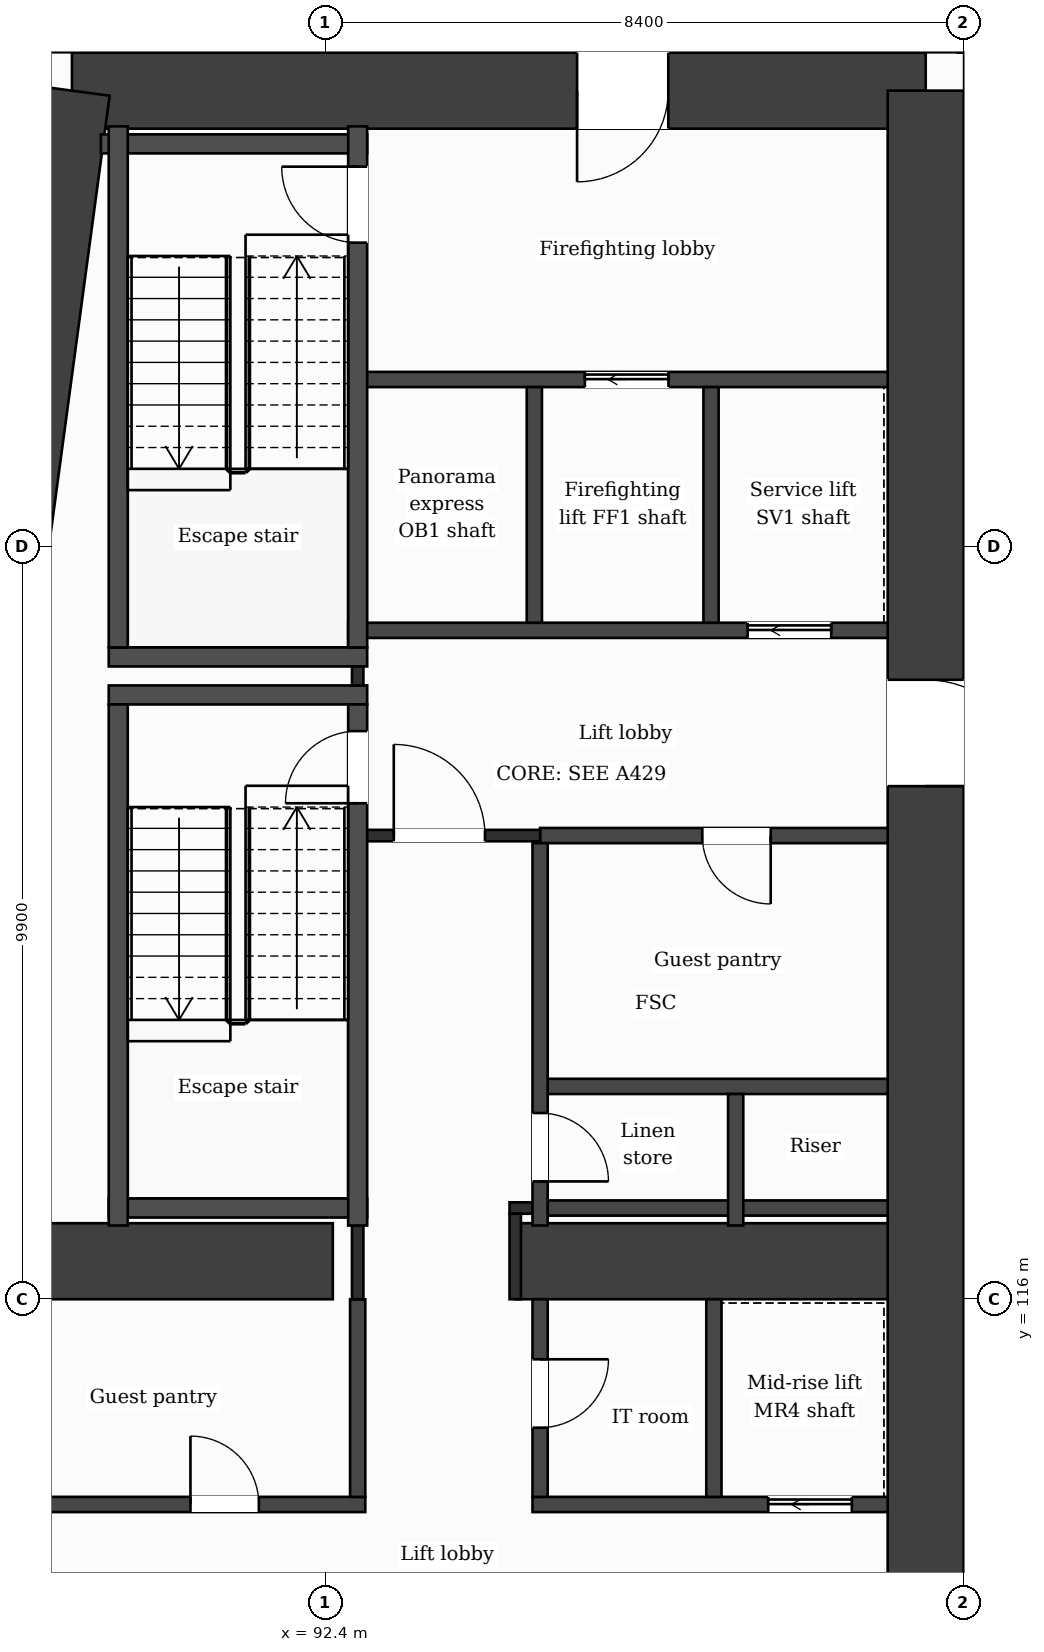
"""IFC4 building model, lengths in metres.
Left out: names, types, materials, properties, quantities, classifications, styles, units other than length and angle.
Written with IfcOpenShell. Run it as: python <this file> out.ifc"""

import sys

from ifc_helpers import new_model, si_unit, direction, frame, frame_2d, origin, place, context, subcontext, project, spatial, rectangle, extrude, element, fill, save


model = new_model("IFC4")
c1 = context("Model", 3, precision=1e-05, world=origin(), true_north=direction((0.0, 1.0)))
c2 = subcontext(c1, "Body", "Model", "MODEL_VIEW")
j1 = project(units=[si_unit("LENGTHUNIT", "METRE"), si_unit("PLANEANGLEUNIT", "RADIAN")], contexts=[c1])
p1 = place(None, origin())
s1 = spatial("IfcSite", under=j1, at=p1, CompositionType="ELEMENT")
p2 = place(p1, origin())
s2 = spatial("IfcBuilding", under=s1, at=p2, CompositionType="ELEMENT")
p3 = place(p2, frame((0.0, 0.0, 120.6)))
s3 = spatial("IfcBuildingStorey", under=s2, at=p3, CompositionType="ELEMENT", Elevation=120.6)
p4 = place(p3, frame((89.068, 131.9, 0.0), z_axis=(0.0, 0.0, 1.0), x_axis=(1.0, 0.0, 0.0)))
e1 = element("IfcWall", 1, at=p4, inside=s3, PredefinedType="SHEAR", context=c2, shape_type="SweptSolid", body=[
    extrude(rectangle(XDim=11.232, YDim=1.0, at=frame_2d((5.616, 0.0))), origin(), (0.0, 0.0, 1.0), 3.7),
])
p5 = place(p4, frame((6.646, 0.0, 0.0)))
e2 = element("IfcOpeningElement", 2, at=p5, cuts=e1, PredefinedType="OPENING", context=c2, shape_type="SweptSolid", body=[
    extrude(rectangle(XDim=1.2, YDim=2.1, at=frame_2d((0.6, 1.05))), frame((0.0, 0.51, 0.0), z_axis=(0.0, -1.0, 0.0), x_axis=(1.0, 0.0, 0.0)), (0.0, 0.0, 1.0), 1.02),
])
p6 = place(p3, frame((100.3, 131.9, 0.0), z_axis=(0.0, 0.0, 1.0), x_axis=(0.0, -1.0, 0.0)))
e3 = element("IfcWall", 3, at=p6, inside=s3, PredefinedType="SHEAR", context=c2, shape_type="SweptSolid", body=[
    extrude(rectangle(XDim=21.0, YDim=1.0, at=frame_2d((10.5, 0.0))), origin(), (0.0, 0.0, 1.0), 3.7),
])
p7 = place(p6, frame((7.75, 0.0, 0.0)))
e4 = element("IfcOpeningElement", 4, at=p7, cuts=e3, PredefinedType="OPENING", context=c2, shape_type="SweptSolid", body=[
    extrude(rectangle(XDim=1.4, YDim=2.1, at=frame_2d((0.7, 1.05))), frame((0.0, 0.51, 0.0), z_axis=(0.0, -1.0, 0.0), x_axis=(1.0, 0.0, 0.0)), (0.0, 0.0, 1.0), 1.02),
])
p8 = place(p3, frame((86.241, 110.9, 0.0), z_axis=(0.0, 0.0, 1.0), x_axis=(0.133411141623, 0.991060778808, 0.0)))
e5 = element("IfcWall", 5, at=p8, inside=s3, PredefinedType="SHEAR", context=c2, shape_type="SweptSolid", body=[
    extrude(rectangle(XDim=21.189, YDim=1.0, at=frame_2d((10.595, 0.0))), origin(), (0.0, 0.0, 1.0), 3.7),
])
p9 = place(p3, frame((87.423, 116.5, 0.0), z_axis=(0.0, 0.0, 1.0), x_axis=(1.0, 0.0, 0.0)))
e6 = element("IfcWall", 6, at=p9, inside=s3, PredefinedType="SHEAR", context=c2, shape_type="SweptSolid", body=[
    extrude(rectangle(XDim=5.077, YDim=1.0, at=frame_2d((2.539, 0.0))), origin(), (0.0, 0.0, 1.0), 3.7),
])
p10 = place(p3, frame((94.9, 116.5, 0.0), z_axis=(0.0, 0.0, 1.0), x_axis=(1.0, 0.0, 0.0)))
e7 = element("IfcWall", 7, at=p10, inside=s3, PredefinedType="SHEAR", context=c2, shape_type="SweptSolid", body=[
    extrude(rectangle(XDim=4.9, YDim=1.0, at=frame_2d((2.45, 0.0))), origin(), (0.0, 0.0, 1.0), 3.7),
])
p11 = place(p3, frame((91.177, 138.95, 0.0), z_axis=(0.0, 0.0, 1.0), x_axis=(-0.133426664613, -0.991058689065, 0.0)))
e8 = element("IfcWall", 8, at=p11, inside=s3, PredefinedType="SOLIDWALL", context=c2, shape_type="SweptSolid", body=[
    extrude(rectangle(XDim=6.609, YDim=0.3, at=frame_2d((3.305, 0.0))), origin(), (0.0, 0.0, 1.0), 3.38),
])
p12 = place(p11, frame((1.039, 0.0, 0.9)))
e9 = element("IfcOpeningElement", 9, at=p12, cuts=e8, PredefinedType="OPENING", context=c2, shape_type="SweptSolid", body=[
    extrude(rectangle(XDim=1.2, YDim=2.1, at=frame_2d((0.6, 1.05))), frame((0.0, 0.16, 0.0), z_axis=(0.0, -1.0, 0.0), x_axis=(1.0, 0.0, 0.0)), (0.0, 0.0, 1.0), 0.32),
])
p13 = place(p11, frame((4.294, 0.0, 0.0)))
e10 = element("IfcOpeningElement", 10, at=p13, cuts=e8, PredefinedType="OPENING", context=c2, shape_type="SweptSolid", body=[
    extrude(rectangle(XDim=1.2, YDim=2.4, at=frame_2d((0.6, 1.2))), frame((0.0, 0.16, 0.0), z_axis=(0.0, -1.0, 0.0), x_axis=(1.0, 0.0, 0.0)), (0.0, 0.0, 1.0), 0.32),
])
p14 = place(p3, frame((87.039, 113.3, 0.0), z_axis=(0.0, 0.0, 1.0), x_axis=(1.0, 0.0, 0.0)))
e11 = element("IfcWall", 11, at=p14, inside=s3, PredefinedType="PARTITIONING", context=c2, shape_type="SweptSolid", body=[
    extrude(rectangle(XDim=5.888, YDim=0.2, at=frame_2d((2.944, 0.0))), origin(), (0.0, 0.0, 1.0), 3.38),
])
p15 = place(p14, frame((3.588, 0.0, 0.0)))
e12 = element("IfcOpeningElement", 12, at=p15, cuts=e11, PredefinedType="OPENING", context=c2, shape_type="SweptSolid", body=[
    extrude(rectangle(XDim=0.9, YDim=2.1, at=frame_2d((0.45, 1.05))), frame((0.0, 0.11, 0.0), z_axis=(0.0, -1.0, 0.0), x_axis=(1.0, 0.0, 0.0)), (0.0, 0.0, 1.0), 0.22),
])
p16 = place(p3, frame((95.127, 113.3, 0.0), z_axis=(0.0, 0.0, 1.0), x_axis=(1.0, 0.0, 0.0)))
e13 = element("IfcWall", 13, at=p16, inside=s3, PredefinedType="PARTITIONING", context=c2, shape_type="SweptSolid", body=[
    extrude(rectangle(XDim=4.673, YDim=0.2, at=frame_2d((2.336, 0.0))), origin(), (0.0, 0.0, 1.0), 3.38),
])
p17 = place(p16, frame((3.101, 0.0, 0.0)))
e14 = element("IfcOpeningElement", 14, at=p17, cuts=e13, PredefinedType="OPENING", context=c2, shape_type="SweptSolid", body=[
    extrude(rectangle(XDim=1.1, YDim=2.1, at=frame_2d((0.55, 1.05))), frame((0.0, 0.11, 0.0), z_axis=(0.0, -1.0, 0.0), x_axis=(1.0, 0.0, 0.0)), (0.0, 0.0, 1.0), 0.22),
])
p18 = place(p3, frame((95.227, 117.2, 0.0), z_axis=(0.0, 0.0, 1.0), x_axis=(1.0, 0.0, 0.0)))
e15 = element("IfcWall", 15, at=p18, inside=s3, PredefinedType="PARTITIONING", context=c2, shape_type="SweptSolid", body=[
    extrude(rectangle(XDim=4.573, YDim=0.2, at=frame_2d((2.287, 0.0))), origin(), (0.0, 0.0, 1.0), 3.38),
])
p19 = place(p3, frame((94.825, 117.2, 0.0), z_axis=(0.0, 0.0, 1.0), x_axis=(1.0, 0.0, 0.0)))
e16 = element("IfcWall", 16, at=p19, inside=s3, PredefinedType="PARTITIONING", context=c2, shape_type="SweptSolid", body=[
    extrude(rectangle(XDim=0.402, YDim=0.15, at=frame_2d((0.201, 0.0))), origin(), (0.0, 0.0, 1.0), 3.38),
])
p20 = place(p3, frame((89.552, 117.2, 0.0), z_axis=(0.0, 0.0, 1.0), x_axis=(1.0, 0.0, 0.0)))
e17 = element("IfcWall", 17, at=p20, inside=s3, PredefinedType="PARTITIONING", context=c2, shape_type="SweptSolid", body=[
    extrude(rectangle(XDim=3.4, YDim=0.25, at=frame_2d((1.7, 0.0))), origin(), (0.0, 0.0, 1.0), 3.38),
])
p21 = place(p3, frame((95.227, 118.8, 0.0), z_axis=(0.0, 0.0, 1.0), x_axis=(1.0, 0.0, 0.0)))
e18 = element("IfcWall", 18, at=p21, inside=s3, PredefinedType="PARTITIONING", context=c2, shape_type="SweptSolid", body=[
    extrude(rectangle(XDim=4.573, YDim=0.2, at=frame_2d((2.287, 0.0))), origin(), (0.0, 0.0, 1.0), 3.38),
])
p22 = place(p3, frame((95.227, 122.1, 0.0), z_axis=(0.0, 0.0, 1.0), x_axis=(1.0, 0.0, 0.0)))
e19 = element("IfcWall", 19, at=p22, inside=s3, PredefinedType="PARTITIONING", context=c2, shape_type="SweptSolid", body=[
    extrude(rectangle(XDim=4.573, YDim=0.2, at=frame_2d((2.287, 0.0))), origin(), (0.0, 0.0, 1.0), 3.38),
])
p23 = place(p22, frame((2.134, 0.0, 0.0)))
e20 = element("IfcOpeningElement", 20, at=p23, cuts=e19, PredefinedType="OPENING", context=c2, shape_type="SweptSolid", body=[
    extrude(rectangle(XDim=0.9, YDim=2.1, at=frame_2d((0.45, 1.05))), frame((0.0, 0.11, 0.0), z_axis=(0.0, -1.0, 0.0), x_axis=(1.0, 0.0, 0.0)), (0.0, 0.0, 1.0), 0.22),
])
p24 = place(p3, frame((92.827, 122.1, 0.0), z_axis=(0.0, 0.0, 1.0), x_axis=(1.0, 0.0, 0.0)))
e21 = element("IfcWall", 21, at=p24, inside=s3, PredefinedType="PARTITIONING", context=c2, shape_type="SweptSolid", body=[
    extrude(rectangle(XDim=2.4, YDim=0.15, at=frame_2d((1.2, 0.0))), origin(), (0.0, 0.0, 1.0), 3.38),
])
p25 = place(p24, frame((0.475, 0.0, 0.0)))
e22 = element("IfcOpeningElement", 22, at=p25, cuts=e21, PredefinedType="OPENING", context=c2, shape_type="SweptSolid", body=[
    extrude(rectangle(XDim=1.2, YDim=2.1, at=frame_2d((0.6, 1.05))), frame((0.0, 0.085, 0.0), z_axis=(0.0, -1.0, 0.0), x_axis=(1.0, 0.0, 0.0)), (0.0, 0.0, 1.0), 0.17),
])
for number, where, z_axis, x_axis in (
    (23, (89.552, 123.95, 0.0), (0.0, 0.0, 1.0), (1.0, 0.0, 0.0)),
    (24, (89.552, 124.45, 0.0), (0.0, 0.0, 1.0), (1.0, 0.0, 0.0)),
):
    element("IfcWall", number, at=place(p3, frame(where, z_axis=z_axis, x_axis=x_axis)), inside=s3, PredefinedType="PARTITIONING", context=c2, shape_type="SweptSolid", body=[
        extrude(rectangle(XDim=3.4, YDim=0.25, at=frame_2d((1.7, 0.0))), origin(), (0.0, 0.0, 1.0), 3.38),
    ])
p26 = place(p3, frame((92.702, 124.8, 0.0), z_axis=(0.0, 0.0, 1.0), x_axis=(1.0, 0.0, 0.0)))
e25 = element("IfcWall", 25, at=p26, inside=s3, PredefinedType="PARTITIONING", context=c2, shape_type="SweptSolid", body=[
    extrude(rectangle(XDim=7.098, YDim=0.2, at=frame_2d((3.549, 0.0))), origin(), (0.0, 0.0, 1.0), 3.38),
])
p27 = place(p26, frame((5.255, 0.0, 0.0)))
e26 = element("IfcOpeningElement", 26, at=p27, cuts=e25, PredefinedType="OPENING", context=c2, shape_type="SweptSolid", body=[
    extrude(rectangle(XDim=1.1, YDim=2.1, at=frame_2d((0.55, 1.05))), frame((0.0, 0.11, 0.0), z_axis=(0.0, -1.0, 0.0), x_axis=(1.0, 0.0, 0.0)), (0.0, 0.0, 1.0), 0.22),
])
p28 = place(p3, frame((92.827, 128.1, 0.0), z_axis=(0.0, 0.0, 1.0), x_axis=(1.0, 0.0, 0.0)))
e27 = element("IfcWall", 27, at=p28, inside=s3, PredefinedType="PARTITIONING", context=c2, shape_type="SweptSolid", body=[
    extrude(rectangle(XDim=6.973, YDim=0.2, at=frame_2d((3.487, 0.0))), origin(), (0.0, 0.0, 1.0), 3.38),
])
p29 = place(p28, frame((2.989, 0.0, 0.0)))
e28 = element("IfcOpeningElement", 28, at=p29, cuts=e27, PredefinedType="OPENING", context=c2, shape_type="SweptSolid", body=[
    extrude(rectangle(XDim=1.1, YDim=2.1, at=frame_2d((0.55, 1.05))), frame((0.0, 0.11, 0.0), z_axis=(0.0, -1.0, 0.0), x_axis=(1.0, 0.0, 0.0)), (0.0, 0.0, 1.0), 0.22),
])
p30 = place(p3, frame((89.448, 131.2, 0.0), z_axis=(0.0, 0.0, 1.0), x_axis=(1.0, 0.0, 0.0)))
e29 = element("IfcWall", 29, at=p30, inside=s3, PredefinedType="PARTITIONING", context=c2, shape_type="SweptSolid", body=[
    extrude(rectangle(XDim=3.504, YDim=0.25, at=frame_2d((1.752, 0.0))), origin(), (0.0, 0.0, 1.0), 3.38),
])
for number, where, z_axis, x_axis in (
    (30, (89.677, 116.97, 0.0), (0.0, 0.0, 1.0), (0.0, 1.0, 0.0)),
    (31, (89.677, 124.575, 0.0), (0.0, 0.0, 1.0), (0.0, 1.0, 0.0)),
):
    element("IfcWall", number, at=place(p3, frame(where, z_axis=z_axis, x_axis=x_axis)), inside=s3, PredefinedType="PARTITIONING", context=c2, shape_type="SweptSolid", body=[
        extrude(rectangle(XDim=6.855, YDim=0.25, at=frame_2d((3.427, 0.0))), origin(), (0.0, 0.0, 1.0), 3.38),
    ])
p31 = place(p3, frame((92.827, 113.4, 0.0), z_axis=(0.0, 0.0, 1.0), x_axis=(0.0, 1.0, 0.0)))
e32 = element("IfcWall", 32, at=p31, inside=s3, PredefinedType="PARTITIONING", context=c2, shape_type="SweptSolid", body=[
    extrude(rectangle(XDim=2.6, YDim=0.2, at=frame_2d((1.3, 0.0))), origin(), (0.0, 0.0, 1.0), 3.38),
])
p32 = place(p3, frame((92.827, 116.0, 0.0), z_axis=(0.0, 0.0, 1.0), x_axis=(0.0, 1.0, 0.0)))
e33 = element("IfcWall", 33, at=p32, inside=s3, PredefinedType="PARTITIONING", context=c2, shape_type="SweptSolid", body=[
    extrude(rectangle(XDim=0.97, YDim=0.15, at=frame_2d((0.485, 0.0))), origin(), (0.0, 0.0, 1.0), 3.38),
])
p33 = place(p3, frame((92.827, 124.075, 0.0), z_axis=(0.0, 0.0, 1.0), x_axis=(0.0, 1.0, 0.0)))
e34 = element("IfcWall", 34, at=p33, inside=s3, PredefinedType="PARTITIONING", context=c2, shape_type="SweptSolid", body=[
    extrude(rectangle(XDim=0.25, YDim=0.15, at=frame_2d((0.125, 0.0))), origin(), (0.0, 0.0, 1.0), 3.38),
])
p34 = place(p3, frame((92.827, 116.97, 0.0), z_axis=(0.0, 0.0, 1.0), x_axis=(0.0, 1.0, 0.0)))
e35 = element("IfcWall", 35, at=p34, inside=s3, PredefinedType="PARTITIONING", context=c2, shape_type="SweptSolid", body=[
    extrude(rectangle(XDim=6.855, YDim=0.25, at=frame_2d((3.427, 0.0))), origin(), (0.0, 0.0, 1.0), 3.38),
])
p35 = place(p34, frame((5.555, 0.0, 0.0)))
e36 = element("IfcOpeningElement", 36, at=p35, cuts=e35, PredefinedType="OPENING", context=c2, shape_type="SweptSolid", body=[
    extrude(rectangle(XDim=0.95, YDim=2.1, at=frame_2d((0.475, 1.05))), frame((0.0, 0.135, 0.0), z_axis=(0.0, -1.0, 0.0), x_axis=(1.0, 0.0, 0.0)), (0.0, 0.0, 1.0), 0.27),
])
p36 = place(p3, frame((92.827, 124.575, 0.0), z_axis=(0.0, 0.0, 1.0), x_axis=(0.0, 1.0, 0.0)))
e37 = element("IfcWall", 37, at=p36, inside=s3, PredefinedType="PARTITIONING", context=c2, shape_type="SweptSolid", body=[
    extrude(rectangle(XDim=6.855, YDim=0.25, at=frame_2d((3.427, 0.0))), origin(), (0.0, 0.0, 1.0), 3.38),
])
p37 = place(p36, frame((5.325, 0.0, 0.0)))
e38 = element("IfcOpeningElement", 38, at=p37, cuts=e37, PredefinedType="OPENING", context=c2, shape_type="SweptSolid", body=[
    extrude(rectangle(XDim=1.0, YDim=2.1, at=frame_2d((0.5, 1.05))), frame((0.0, 0.135, 0.0), z_axis=(0.0, -1.0, 0.0), x_axis=(1.0, 0.0, 0.0)), (0.0, 0.0, 1.0), 0.27),
])
p38 = place(p3, frame((94.9, 116.0, 0.0), z_axis=(0.0, 0.0, 1.0), x_axis=(0.0, 1.0, 0.0)))
e39 = element("IfcWall", 39, at=p38, inside=s3, PredefinedType="PARTITIONING", context=c2, shape_type="SweptSolid", body=[
    extrude(rectangle(XDim=1.125, YDim=0.15, at=frame_2d((0.562, 0.0))), origin(), (0.0, 0.0, 1.0), 3.38),
])
p39 = place(p3, frame((95.151, 124.9, 0.0), z_axis=(0.0, 0.0, 1.0), x_axis=(0.0, 1.0, 0.0)))
e40 = element("IfcWall", 40, at=p39, inside=s3, PredefinedType="PARTITIONING", context=c2, shape_type="SweptSolid", body=[
    extrude(rectangle(XDim=3.1, YDim=0.2, at=frame_2d((1.55, 0.0))), origin(), (0.0, 0.0, 1.0), 3.38),
])
p40 = place(p3, frame((95.227, 113.4, 0.0), z_axis=(0.0, 0.0, 1.0), x_axis=(0.0, 1.0, 0.0)))
e41 = element("IfcWall", 41, at=p40, inside=s3, PredefinedType="PARTITIONING", context=c2, shape_type="SweptSolid", body=[
    extrude(rectangle(XDim=2.6, YDim=0.2, at=frame_2d((1.3, 0.0))), origin(), (0.0, 0.0, 1.0), 3.38),
])
p41 = place(p40, frame((0.91, 0.0, 0.0)))
e42 = element("IfcOpeningElement", 42, at=p41, cuts=e41, PredefinedType="OPENING", context=c2, shape_type="SweptSolid", body=[
    extrude(rectangle(XDim=0.9, YDim=2.1, at=frame_2d((0.45, 1.05))), frame((0.0, 0.11, 0.0), z_axis=(0.0, -1.0, 0.0), x_axis=(1.0, 0.0, 0.0)), (0.0, 0.0, 1.0), 0.22),
])
p42 = place(p3, frame((95.227, 116.97, 0.0), z_axis=(0.0, 0.0, 1.0), x_axis=(0.0, 1.0, 0.0)))
e43 = element("IfcWall", 43, at=p42, inside=s3, PredefinedType="PARTITIONING", context=c2, shape_type="SweptSolid", body=[
    extrude(rectangle(XDim=5.03, YDim=0.2, at=frame_2d((2.515, 0.0))), origin(), (0.0, 0.0, 1.0), 3.38),
])
p43 = place(p42, frame((0.58, 0.0, 0.0)))
e44 = element("IfcOpeningElement", 44, at=p43, cuts=e43, PredefinedType="OPENING", context=c2, shape_type="SweptSolid", body=[
    extrude(rectangle(XDim=0.9, YDim=2.1, at=frame_2d((0.45, 1.05))), frame((0.0, 0.11, 0.0), z_axis=(0.0, -1.0, 0.0), x_axis=(1.0, 0.0, 0.0)), (0.0, 0.0, 1.0), 0.22),
])
p44 = place(p3, frame((97.476, 124.9, 0.0), z_axis=(0.0, 0.0, 1.0), x_axis=(0.0, 1.0, 0.0)))
e45 = element("IfcWall", 45, at=p44, inside=s3, PredefinedType="PARTITIONING", context=c2, shape_type="SweptSolid", body=[
    extrude(rectangle(XDim=3.1, YDim=0.2, at=frame_2d((1.55, 0.0))), origin(), (0.0, 0.0, 1.0), 3.38),
])
p45 = place(p3, frame((97.513, 113.4, 0.0), z_axis=(0.0, 0.0, 1.0), x_axis=(0.0, 1.0, 0.0)))
e46 = element("IfcWall", 46, at=p45, inside=s3, PredefinedType="PARTITIONING", context=c2, shape_type="SweptSolid", body=[
    extrude(rectangle(XDim=2.6, YDim=0.2, at=frame_2d((1.3, 0.0))), origin(), (0.0, 0.0, 1.0), 3.38),
])
p46 = place(p3, frame((97.8, 116.97, 0.0), z_axis=(0.0, 0.0, 1.0), x_axis=(0.0, 1.0, 0.0)))
e47 = element("IfcWall", 47, at=p46, inside=s3, PredefinedType="PARTITIONING", context=c2, shape_type="SweptSolid", body=[
    extrude(rectangle(XDim=1.73, YDim=0.2, at=frame_2d((0.865, 0.0))), origin(), (0.0, 0.0, 1.0), 3.38),
])
p47 = place(p25, origin())
e48 = element("IfcDoor", 48, at=p47, inside=s3, OperationType="SINGLE_SWING_LEFT", PredefinedType="DOOR", context=c2, shape_type="SweptSolid", body=[
    extrude(rectangle(XDim=1.2, YDim=2.1, at=frame_2d((0.6, 1.05))), frame((0.0, 0.025, 0.0), z_axis=(0.0, -1.0, 0.0), x_axis=(1.0, 0.0, 0.0)), (0.0, 0.0, 1.0), 0.05),
])
fill(e22, e48)
p48 = place(p29, origin())
e49 = element("IfcDoor", 49, at=p48, inside=s3, OperationType="SLIDING_TO_LEFT", PredefinedType="DOOR", context=c2, shape_type="SweptSolid", body=[
    extrude(rectangle(XDim=1.1, YDim=2.1, at=frame_2d((0.55, 1.05))), frame((0.0, 0.025, 0.0), z_axis=(0.0, -1.0, 0.0), x_axis=(1.0, 0.0, 0.0)), (0.0, 0.0, 1.0), 0.05),
])
fill(e28, e49)
p49 = place(p27, origin())
e50 = element("IfcDoor", 50, at=p49, inside=s3, OperationType="SLIDING_TO_LEFT", PredefinedType="DOOR", context=c2, shape_type="SweptSolid", body=[
    extrude(rectangle(XDim=1.1, YDim=2.1, at=frame_2d((0.55, 1.05))), frame((0.0, 0.025, 0.0), z_axis=(0.0, -1.0, 0.0), x_axis=(1.0, 0.0, 0.0)), (0.0, 0.0, 1.0), 0.05),
])
fill(e26, e50)
p50 = place(p23, origin())
e51 = element("IfcDoor", 51, at=p50, inside=s3, OperationType="SINGLE_SWING_RIGHT", PredefinedType="DOOR", context=c2, shape_type="SweptSolid", body=[
    extrude(rectangle(XDim=0.9, YDim=2.1, at=frame_2d((0.45, 1.05))), frame((0.0, 0.025, 0.0), z_axis=(0.0, -1.0, 0.0), x_axis=(1.0, 0.0, 0.0)), (0.0, 0.0, 1.0), 0.05),
])
fill(e20, e51)
p51 = place(p35, origin())
e52 = element("IfcDoor", 52, at=p51, inside=s3, OperationType="SINGLE_SWING_LEFT", PredefinedType="DOOR", context=c2, shape_type="SweptSolid", body=[
    extrude(rectangle(XDim=0.95, YDim=2.1, at=frame_2d((0.475, 1.05))), frame((0.0, 0.025, 0.0), z_axis=(0.0, -1.0, 0.0), x_axis=(1.0, 0.0, 0.0)), (0.0, 0.0, 1.0), 0.05),
])
fill(e36, e52)
p52 = place(p37, origin())
e53 = element("IfcDoor", 53, at=p52, inside=s3, OperationType="SINGLE_SWING_RIGHT", PredefinedType="DOOR", context=c2, shape_type="SweptSolid", body=[
    extrude(rectangle(XDim=1.0, YDim=2.1, at=frame_2d((0.5, 1.05))), frame((0.0, 0.025, 0.0), z_axis=(0.0, -1.0, 0.0), x_axis=(1.0, 0.0, 0.0)), (0.0, 0.0, 1.0), 0.05),
])
fill(e38, e53)
p53 = place(p43, origin())
e54 = element("IfcDoor", 54, at=p53, inside=s3, OperationType="SINGLE_SWING_LEFT", PredefinedType="DOOR", context=c2, shape_type="SweptSolid", body=[
    extrude(rectangle(XDim=0.9, YDim=2.1, at=frame_2d((0.45, 1.05))), frame((0.0, 0.025, 0.0), z_axis=(0.0, -1.0, 0.0), x_axis=(1.0, 0.0, 0.0)), (0.0, 0.0, 1.0), 0.05),
])
fill(e44, e54)
p54 = place(p17, origin())
e55 = element("IfcDoor", 55, at=p54, inside=s3, OperationType="SLIDING_TO_LEFT", PredefinedType="DOOR", context=c2, shape_type="SweptSolid", body=[
    extrude(rectangle(XDim=1.1, YDim=2.1, at=frame_2d((0.55, 1.05))), frame((0.0, 0.025, 0.0), z_axis=(0.0, -1.0, 0.0), x_axis=(1.0, 0.0, 0.0)), (0.0, 0.0, 1.0), 0.05),
])
fill(e14, e55)
p55 = place(p15, origin())
e56 = element("IfcDoor", 56, at=p55, inside=s3, OperationType="SINGLE_SWING_LEFT", PredefinedType="DOOR", context=c2, shape_type="SweptSolid", body=[
    extrude(rectangle(XDim=0.9, YDim=2.1, at=frame_2d((0.45, 1.05))), frame((0.0, 0.025, 0.0), z_axis=(0.0, -1.0, 0.0), x_axis=(1.0, 0.0, 0.0)), (0.0, 0.0, 1.0), 0.05),
])
fill(e12, e56)
p56 = place(p41, origin())
e57 = element("IfcDoor", 57, at=p56, inside=s3, OperationType="SINGLE_SWING_RIGHT", PredefinedType="DOOR", context=c2, shape_type="SweptSolid", body=[
    extrude(rectangle(XDim=0.9, YDim=2.1, at=frame_2d((0.45, 1.05))), frame((0.0, 0.025, 0.0), z_axis=(0.0, -1.0, 0.0), x_axis=(1.0, 0.0, 0.0)), (0.0, 0.0, 1.0), 0.05),
])
fill(e42, e57)
p57 = place(p5, origin())
e58 = element("IfcDoor", 58, at=p57, inside=s3, OperationType="SINGLE_SWING_LEFT", PredefinedType="DOOR", context=c2, shape_type="SweptSolid", body=[
    extrude(rectangle(XDim=1.2, YDim=2.1, at=frame_2d((0.6, 1.05))), frame((0.0, 0.025, 0.0), z_axis=(0.0, -1.0, 0.0), x_axis=(1.0, 0.0, 0.0)), (0.0, 0.0, 1.0), 0.05),
])
fill(e2, e58)
p58 = place(p7, origin())
e59 = element("IfcDoor", 59, at=p58, inside=s3, OperationType="SINGLE_SWING_RIGHT", PredefinedType="DOOR", context=c2, shape_type="SweptSolid", body=[
    extrude(rectangle(XDim=1.4, YDim=2.1, at=frame_2d((0.7, 1.05))), frame((0.0, 0.025, 0.0), z_axis=(0.0, -1.0, 0.0), x_axis=(1.0, 0.0, 0.0)), (0.0, 0.0, 1.0), 0.05),
])
fill(e4, e59)
save(model, sys.argv[1])
